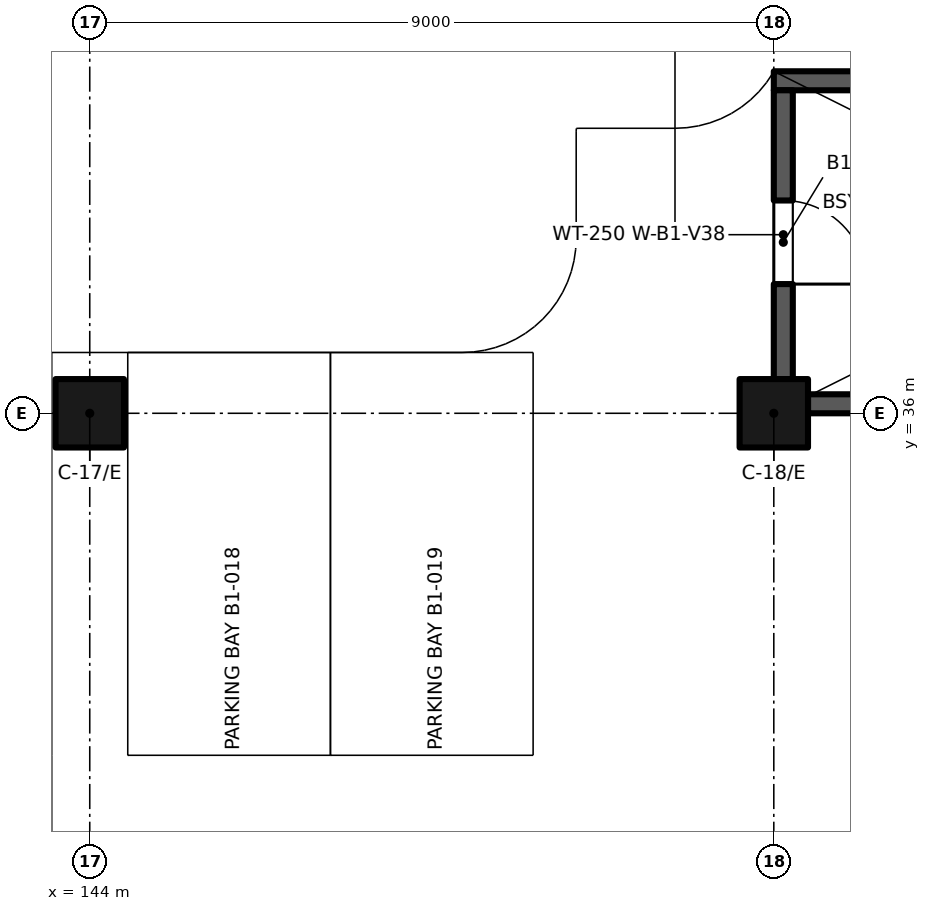
"""IFC4 building model, lengths in metres.
Left out: names, types, materials, properties, quantities, classifications, styles, units other than length and angle.
Written with IfcOpenShell. Run it as: python <this file> out.ifc"""

import sys

from ifc_helpers import new_model, si_unit, direction, frame, frame_2d, origin, origin_2d, place, context, subcontext, project, spatial, rectangle, extrude, element, fill, save


model = new_model("IFC4")
c1 = context("Model", 3, precision=1e-05, world=origin(), true_north=direction((0.0, 1.0)))
c2 = subcontext(c1, "Body", "Model", "MODEL_VIEW")
j1 = project(units=[si_unit("LENGTHUNIT", "METRE"), si_unit("PLANEANGLEUNIT", "RADIAN")], contexts=[c1])
p1 = place(None, origin())
s1 = spatial("IfcSite", under=j1, at=p1, CompositionType="ELEMENT")
p2 = place(p1, origin())
s2 = spatial("IfcBuilding", under=s1, at=p2, CompositionType="ELEMENT")
p3 = place(p2, frame((0.0, 0.0, -5.1)))
s3 = spatial("IfcBuildingStorey", under=s2, at=p3, CompositionType="ELEMENT", Elevation=-5.1)
for number, where, z_axis, x_axis in (
    (1, (144.0, 36.0, 0.0), (0.0, 0.0, 1.0), (1.0, 0.0, 0.0)),
    (2, (153.0, 36.0, 0.0), (0.0, 0.0, 1.0), (1.0, 0.0, 0.0)),
):
    element("IfcColumn", number, at=place(p3, frame(where, z_axis=z_axis, x_axis=x_axis)), inside=s3, PredefinedType="COLUMN", context=c2, shape_type="SweptSolid", body=[
        extrude(rectangle(XDim=0.9, YDim=0.9, at=origin_2d()), origin(), (0.0, 0.0, 1.0), 5.1),
    ])
p4 = place(p3, frame((153.45, 36.125, 0.0), z_axis=(0.0, 0.0, 1.0), x_axis=(1.0, 0.0, 0.0)))
e3 = element("IfcWall", 3, at=p4, inside=s3, PredefinedType="SHEAR", context=c2, shape_type="SweptSolid", body=[
    extrude(rectangle(XDim=8.1, YDim=0.25, at=frame_2d((4.05, 0.0))), origin(), (0.0, 0.0, 1.0), 5.1),
])
p5 = place(p3, frame((153.0, 40.375, 0.0), z_axis=(0.0, 0.0, 1.0), x_axis=(1.0, 0.0, 0.0)))
e4 = element("IfcWall", 4, at=p5, inside=s3, PredefinedType="SHEAR", context=c2, shape_type="SweptSolid", body=[
    extrude(rectangle(XDim=9.0, YDim=0.25, at=frame_2d((4.5, 0.0))), origin(), (0.0, 0.0, 1.0), 5.1),
])
p6 = place(p3, frame((153.125, 36.45, 0.0), z_axis=(0.0, 0.0, 1.0), x_axis=(0.0, 1.0, 0.0)))
e5 = element("IfcWall", 5, at=p6, inside=s3, PredefinedType="SHEAR", context=c2, shape_type="SweptSolid", body=[
    extrude(rectangle(XDim=3.8, YDim=0.25, at=frame_2d((1.9, 0.0))), origin(), (0.0, 0.0, 1.0), 5.1),
])
p7 = place(p6, frame((2.35, 0.0, 0.0), z_axis=(0.0, 0.0, 1.0), x_axis=(-1.0, 0.0, 0.0)))
e6 = element("IfcOpeningElement", 6, at=p7, cuts=e5, PredefinedType="OPENING", context=c2, shape_type="SweptSolid", body=[
    extrude(rectangle(XDim=1.1, YDim=2.1, at=frame_2d((0.55, 1.05))), frame((0.0, 0.135, 0.0), z_axis=(0.0, -1.0, 0.0), x_axis=(1.0, 0.0, 0.0)), (0.0, 0.0, 1.0), 0.27),
])
p8 = place(p7, origin())
e7 = element("IfcDoor", 7, at=p8, inside=s3, OperationType="SINGLE_SWING_RIGHT", PredefinedType="DOOR", context=c2, shape_type="SweptSolid", body=[
    extrude(rectangle(XDim=1.1, YDim=2.1, at=frame_2d((0.55, 1.05))), frame((0.0, 0.025, 0.0), z_axis=(0.0, -1.0, 0.0), x_axis=(1.0, 0.0, 0.0)), (0.0, 0.0, 1.0), 0.05),
])
fill(e6, e7)
save(model, sys.argv[1])
